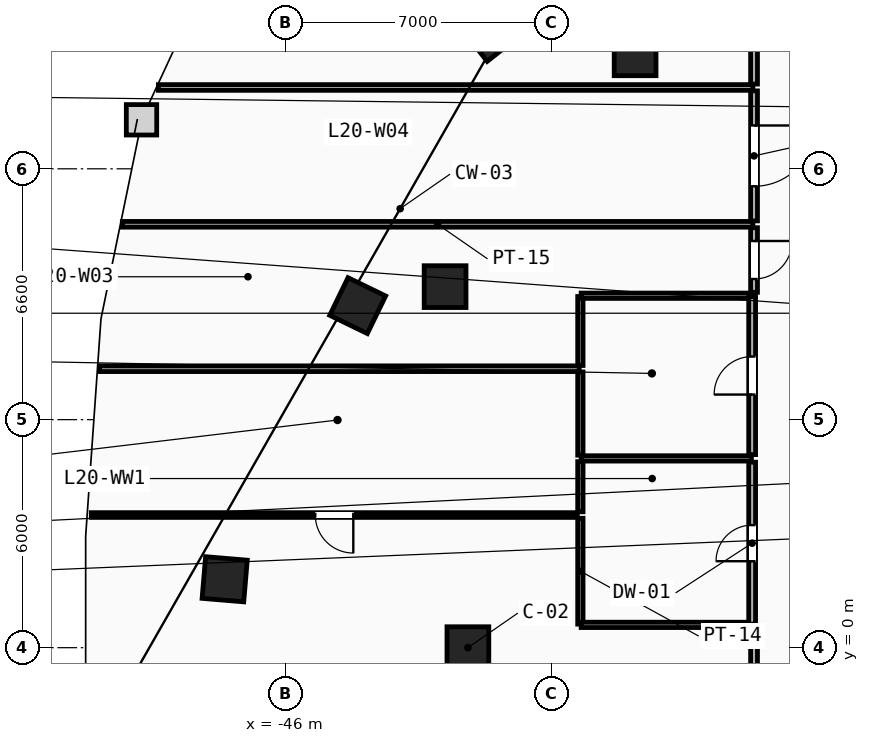
"""IFC4 building model, lengths in metres.
Left out: names, types, materials, properties, quantities, classifications, styles, units other than length and angle.
Written with IfcOpenShell. Run it as: python <this file> out.ifc"""

import sys

from ifc_helpers import new_model, si_unit, direction, frame, frame_2d, origin, origin_2d, place, context, subcontext, project, spatial, rectangle, extrude, element, fill, save


model = new_model("IFC4")
c1 = context("Model", 3, precision=1e-05, world=origin(), true_north=direction((0.0, 1.0)))
c2 = subcontext(c1, "Body", "Model", "MODEL_VIEW")
j1 = project(units=[si_unit("LENGTHUNIT", "METRE"), si_unit("PLANEANGLEUNIT", "RADIAN")], contexts=[c1])
p1 = place(None, origin())
s1 = spatial("IfcSite", under=j1, at=p1, CompositionType="ELEMENT")
p2 = place(p1, origin())
s2 = spatial("IfcBuilding", under=s1, at=p2, CompositionType="ELEMENT")
p3 = place(p2, frame((0.0, 0.0, 81.8)))
s3 = spatial("IfcBuildingStorey", under=s2, at=p3, CompositionType="ELEMENT", Elevation=81.8)
for number, where, z_axis, x_axis in (
    (1, (-41.2, 0.0, 0.0), (0.0, 0.0, 1.0), (1.0, 0.0, 0.0)),
    (2, (-41.8, 9.5, 0.0), (0.0, 0.0, 1.0), (1.0, 0.0, 0.0)),
    (3, (-36.8, 15.6, 0.0), (0.0, 0.0, 1.0), (1.0, 0.0, 0.0)),
    (4, (-40.6, 16.2, 0.0), (0.0, 0.0, 1.0), (-0.785, -0.619, 0.0)),
    (5, (-44.1, 9.0, 0.0), (0.0, 0.0, 1.0), (-0.437, -0.899, 0.0)),
    (6, (-47.6, 1.8, 0.0), (0.0, 0.0, 1.0), (-0.084, -0.997, 0.0)),
):
    element("IfcColumn", number, at=place(p3, frame(where, z_axis=z_axis, x_axis=x_axis)), inside=s3, PredefinedType="COLUMN", context=c2, shape_type="SweptSolid", body=[
        extrude(rectangle(XDim=1.1, YDim=1.1, at=origin_2d()), origin(), (0.0, 0.0, 1.0), 3.6),
    ])
p4 = place(p3, frame((-38.24, 0.62, 0.0), z_axis=(0.0, 0.0, 1.0), x_axis=(0.0, 1.0, 0.0)))
e7 = element("IfcWall", 7, at=p4, inside=s3, PredefinedType="PARTITIONING", context=c2, shape_type="SweptSolid", body=[
    extrude(rectangle(XDim=2.785, YDim=0.14, at=frame_2d((1.393, 0.0))), origin(), (0.0, 0.0, 1.0), 3.3),
])
p5 = place(p3, frame((-38.24, 3.575, 0.0), z_axis=(0.0, 0.0, 1.0), x_axis=(0.0, 1.0, 0.0)))
e8 = element("IfcWall", 8, at=p5, inside=s3, PredefinedType="PARTITIONING", context=c2, shape_type="SweptSolid", body=[
    extrude(rectangle(XDim=1.32, YDim=0.14, at=frame_2d((0.66, 0.0))), origin(), (0.0, 0.0, 1.0), 3.3),
])
p6 = place(p3, frame((-38.24, 5.065, 0.0), z_axis=(0.0, 0.0, 1.0), x_axis=(0.0, 1.0, 0.0)))
e9 = element("IfcWall", 9, at=p6, inside=s3, PredefinedType="PARTITIONING", context=c2, shape_type="SweptSolid", body=[
    extrude(rectangle(XDim=2.19, YDim=0.14, at=frame_2d((1.095, 0.0))), origin(), (0.0, 0.0, 1.0), 3.3),
])
p7 = place(p3, frame((-38.24, 7.425, 0.0), z_axis=(0.0, 0.0, 1.0), x_axis=(0.0, 1.0, 0.0)))
e10 = element("IfcWall", 10, at=p7, inside=s3, PredefinedType="PARTITIONING", context=c2, shape_type="SweptSolid", body=[
    extrude(rectangle(XDim=1.815, YDim=0.14, at=frame_2d((0.907, 0.0))), origin(), (0.0, 0.0, 1.0), 3.3),
])
for number, where, z_axis, x_axis in (
    (11, (-38.22, 0.6, 0.0), (0.0, 0.0, 1.0), (1.0, 0.0, 0.0)),
    (12, (-38.22, 4.98, 0.0), (0.0, 0.0, 1.0), (1.0, 0.0, 0.0)),
    (13, (-38.22, 9.26, 0.0), (0.0, 0.0, 1.0), (1.0, 0.0, 0.0)),
):
    element("IfcWall", number, at=place(p3, frame(where, z_axis=z_axis, x_axis=x_axis)), inside=s3, PredefinedType="PARTITIONING", context=c2, shape_type="SweptSolid", body=[
        extrude(rectangle(XDim=4.48, YDim=0.14, at=frame_2d((2.24, 0.0))), origin(), (0.0, 0.0, 1.0), 3.3),
    ])
p8 = place(p3, frame((-33.72, 0.62, 0.0), z_axis=(0.0, 0.0, 1.0), x_axis=(0.0, 1.0, 0.0)))
e14 = element("IfcWall", 14, at=p8, inside=s3, PredefinedType="PARTITIONING", context=c2, shape_type="SweptSolid", body=[
    extrude(rectangle(XDim=4.26, YDim=0.18, at=frame_2d((2.13, 0.0))), origin(), (0.0, 0.0, 1.0), 3.3),
])
p9 = place(p8, frame((1.655, 0.0, 0.0)))
e15 = element("IfcOpeningElement", 15, at=p9, cuts=e14, PredefinedType="OPENING", context=c2, shape_type="SweptSolid", body=[
    extrude(rectangle(XDim=0.95, YDim=2.1, at=frame_2d((0.475, 1.05))), frame((0.0, 0.1, 0.0), z_axis=(0.0, -1.0, 0.0), x_axis=(1.0, 0.0, 0.0)), (0.0, 0.0, 1.0), 0.2),
])
p10 = place(p3, frame((-33.72, 5.08, 0.0), z_axis=(0.0, 0.0, 1.0), x_axis=(0.0, 1.0, 0.0)))
e16 = element("IfcWall", 16, at=p10, inside=s3, PredefinedType="PARTITIONING", context=c2, shape_type="SweptSolid", body=[
    extrude(rectangle(XDim=4.16, YDim=0.18, at=frame_2d((2.08, 0.0))), origin(), (0.0, 0.0, 1.0), 3.3),
])
p11 = place(p10, frame((1.58, 0.0, 0.0)))
e17 = element("IfcOpeningElement", 17, at=p11, cuts=e16, PredefinedType="OPENING", context=c2, shape_type="SweptSolid", body=[
    extrude(rectangle(XDim=1.0, YDim=2.15, at=frame_2d((0.5, 1.075))), frame((0.0, 0.1, 0.0), z_axis=(0.0, -1.0, 0.0), x_axis=(1.0, 0.0, 0.0)), (0.0, 0.0, 1.0), 0.2),
])
p12 = place(p3, frame((-50.897, 7.34, 0.0), z_axis=(0.0, 0.0, 1.0), x_axis=(1.0, 0.0, 0.0)))
e18 = element("IfcWall", 18, at=p12, inside=s3, PredefinedType="PARTITIONING", context=c2, shape_type="SweptSolid", body=[
    extrude(rectangle(XDim=12.627, YDim=0.15, at=frame_2d((6.314, 0.0))), origin(), (0.0, 0.0, 1.0), 3.3),
])
p13 = place(p3, frame((-50.293, 11.14, 0.0), z_axis=(0.0, 0.0, 1.0), x_axis=(1.0, 0.0, 0.0)))
e19 = element("IfcWall", 19, at=p13, inside=s3, PredefinedType="PARTITIONING", context=c2, shape_type="SweptSolid", body=[
    extrude(rectangle(XDim=16.593, YDim=0.15, at=frame_2d((8.296, 0.0))), origin(), (0.0, 0.0, 1.0), 3.3),
])
p14 = place(p3, frame((-49.343, 14.74, 0.0), z_axis=(0.0, 0.0, 1.0), x_axis=(1.0, 0.0, 0.0)))
e20 = element("IfcWall", 20, at=p14, inside=s3, PredefinedType="PARTITIONING", context=c2, shape_type="SweptSolid", body=[
    extrude(rectangle(XDim=15.643, YDim=0.15, at=frame_2d((7.822, 0.0))), origin(), (0.0, 0.0, 1.0), 3.3),
])
p15 = place(p3, frame((-33.67, 0.509, 0.0), z_axis=(0.0, 0.0, 1.0), x_axis=(0.0, -1.0, 0.0)))
e21 = element("IfcWall", 21, at=p15, inside=s3, PredefinedType="PARTITIONING", context=c2, shape_type="SweptSolid", body=[
    extrude(rectangle(XDim=11.908, YDim=0.18, at=frame_2d((5.954, 0.0))), origin(), (0.0, 0.0, 1.0), 3.3),
])
p16 = place(p3, frame((-33.67, 17.428, 0.0), z_axis=(0.0, 0.0, 1.0), x_axis=(0.0, -1.0, 0.0)))
e22 = element("IfcWall", 22, at=p16, inside=s3, PredefinedType="PARTITIONING", context=c2, shape_type="SweptSolid", body=[
    extrude(rectangle(XDim=2.598, YDim=0.18, at=frame_2d((1.299, 0.0))), origin(), (0.0, 0.0, 1.0), 3.3),
])
p17 = place(p3, frame((-33.67, 11.05, 0.0), z_axis=(0.0, 0.0, 1.0), x_axis=(0.0, -1.0, 0.0)))
e23 = element("IfcWall", 23, at=p17, inside=s3, PredefinedType="PARTITIONING", context=c2, shape_type="SweptSolid", body=[
    extrude(rectangle(XDim=1.699, YDim=0.18, at=frame_2d((0.849, 0.0))), origin(), (0.0, 0.0, 1.0), 3.3),
])
p18 = place(p17, frame((0.349, 0.0, 0.0)))
e24 = element("IfcOpeningElement", 24, at=p18, cuts=e23, PredefinedType="OPENING", context=c2, shape_type="SweptSolid", body=[
    extrude(rectangle(XDim=1.0, YDim=2.15, at=frame_2d((0.5, 1.075))), frame((0.0, 0.1, 0.0), z_axis=(0.0, -1.0, 0.0), x_axis=(1.0, 0.0, 0.0)), (0.0, 0.0, 1.0), 0.2),
])
p19 = place(p3, frame((-33.67, 14.65, 0.0), z_axis=(0.0, 0.0, 1.0), x_axis=(0.0, -1.0, 0.0)))
e25 = element("IfcWall", 25, at=p19, inside=s3, PredefinedType="PARTITIONING", context=c2, shape_type="SweptSolid", body=[
    extrude(rectangle(XDim=3.42, YDim=0.18, at=frame_2d((1.71, 0.0))), origin(), (0.0, 0.0, 1.0), 3.3),
])
p20 = place(p19, frame((0.91, 0.0, 0.0)))
e26 = element("IfcOpeningElement", 26, at=p20, cuts=e25, PredefinedType="OPENING", context=c2, shape_type="SweptSolid", body=[
    extrude(rectangle(XDim=1.6, YDim=2.2, at=frame_2d((0.8, 1.1))), frame((0.0, 0.1, 0.0), z_axis=(0.0, -1.0, 0.0), x_axis=(1.0, 0.0, 0.0)), (0.0, 0.0, 1.0), 0.2),
])
p21 = place(p3, frame((-38.32, 3.49, 0.0), z_axis=(0.0, 0.0, 1.0), x_axis=(-1.0, 0.0, 0.0)))
e27 = element("IfcWall", 27, at=p21, inside=s3, PredefinedType="PARTITIONING", context=c2, shape_type="SweptSolid", body=[
    extrude(rectangle(XDim=12.79, YDim=0.125, at=frame_2d((6.395, 0.0))), origin(), (0.0, 0.0, 1.0), 3.3),
])
p22 = place(p21, frame((5.895, 0.0, 0.0)))
e28 = element("IfcOpeningElement", 28, at=p22, cuts=e27, PredefinedType="OPENING", context=c2, shape_type="SweptSolid", body=[
    extrude(rectangle(XDim=1.0, YDim=2.15, at=frame_2d((0.5, 1.075))), frame((0.0, 0.073, 0.0), z_axis=(0.0, -1.0, 0.0), x_axis=(1.0, 0.0, 0.0)), (0.0, 0.0, 1.0), 0.145),
])
p23 = place(p22, origin())
e29 = element("IfcDoor", 29, at=p23, inside=s3, OperationType="SINGLE_SWING_LEFT", PredefinedType="DOOR", context=c2, shape_type="SweptSolid", body=[
    extrude(rectangle(XDim=1.0, YDim=2.15, at=frame_2d((0.5, 1.075))), frame((0.0, 0.025, 0.0), z_axis=(0.0, -1.0, 0.0), x_axis=(1.0, 0.0, 0.0)), (0.0, 0.0, 1.0), 0.05),
])
fill(e28, e29)
p24 = place(p9, origin())
e30 = element("IfcDoor", 30, at=p24, inside=s3, OperationType="SINGLE_SWING_LEFT", PredefinedType="DOOR", context=c2, shape_type="SweptSolid", body=[
    extrude(rectangle(XDim=0.95, YDim=2.1, at=frame_2d((0.475, 1.05))), frame((0.0, 0.025, 0.0), z_axis=(0.0, -1.0, 0.0), x_axis=(1.0, 0.0, 0.0)), (0.0, 0.0, 1.0), 0.05),
])
fill(e15, e30)
p25 = place(p11, origin())
e31 = element("IfcDoor", 31, at=p25, inside=s3, OperationType="SINGLE_SWING_LEFT", PredefinedType="DOOR", context=c2, shape_type="SweptSolid", body=[
    extrude(rectangle(XDim=1.0, YDim=2.15, at=frame_2d((0.5, 1.075))), frame((0.0, 0.025, 0.0), z_axis=(0.0, -1.0, 0.0), x_axis=(1.0, 0.0, 0.0)), (0.0, 0.0, 1.0), 0.05),
])
fill(e17, e31)
p26 = place(p20, origin())
e32 = element("IfcDoor", 32, at=p26, inside=s3, OperationType="SINGLE_SWING_LEFT", PredefinedType="DOOR", context=c2, shape_type="SweptSolid", body=[
    extrude(rectangle(XDim=1.6, YDim=2.2, at=frame_2d((0.8, 1.1))), frame((0.0, 0.025, 0.0), z_axis=(0.0, -1.0, 0.0), x_axis=(1.0, 0.0, 0.0)), (0.0, 0.0, 1.0), 0.05),
])
fill(e26, e32)
p27 = place(p18, origin())
e33 = element("IfcDoor", 33, at=p27, inside=s3, OperationType="SINGLE_SWING_LEFT", PredefinedType="DOOR", context=c2, shape_type="SweptSolid", body=[
    extrude(rectangle(XDim=1.0, YDim=2.15, at=frame_2d((0.5, 1.075))), frame((0.0, 0.025, 0.0), z_axis=(0.0, -1.0, 0.0), x_axis=(1.0, 0.0, 0.0)), (0.0, 0.0, 1.0), 0.05),
])
fill(e24, e33)
save(model, sys.argv[1])
